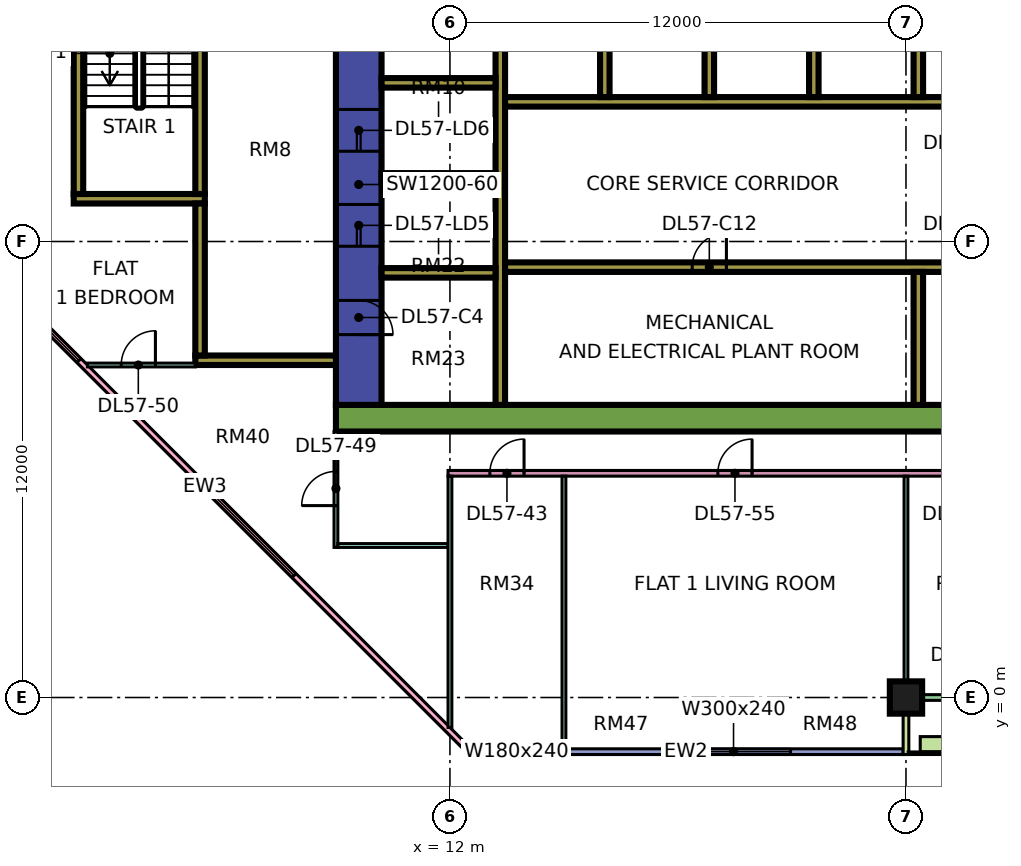
"""IFC4 building model, lengths in metres.
Left out: names, types, materials, properties, quantities, classifications, styles, units other than length and angle.
Written with IfcOpenShell. Run it as: python <this file> out.ifc"""

import sys

from ifc_helpers import new_model, si_unit, direction, frame, frame_2d, origin, origin_2d, place, context, subcontext, project, spatial, rectangle, extrude, element, fill, save


model = new_model("IFC4")
c1 = context("Model", 3, precision=1e-05, world=origin(), true_north=direction((0.0, 1.0)))
c2 = subcontext(c1, "Body", "Model", "MODEL_VIEW")
j1 = project(units=[si_unit("LENGTHUNIT", "METRE"), si_unit("PLANEANGLEUNIT", "RADIAN")], contexts=[c1])
p1 = place(None, origin())
s1 = spatial("IfcSite", under=j1, at=p1, CompositionType="ELEMENT")
p2 = place(p1, origin())
s2 = spatial("IfcBuilding", under=s1, at=p2, CompositionType="ELEMENT")
p3 = place(p2, frame((0.0, 0.0, 241.65)))
s3 = spatial("IfcBuildingStorey", under=s2, at=p3, CompositionType="ELEMENT", Elevation=241.65)
p4 = place(p3, frame((24.0, 0.0, 0.0), z_axis=(0.0, 0.0, 1.0), x_axis=(1.0, 0.0, 0.0)))
e1 = element("IfcColumn", 1, at=p4, inside=s3, PredefinedType="COLUMN", context=c2, shape_type="SweptSolid", body=[
    extrude(rectangle(XDim=0.85, YDim=0.85, at=origin_2d()), origin(), (0.0, 0.0, 1.0), 3.75),
])
p5 = place(p3, frame((9.0, 7.35, 0.0), z_axis=(0.0, 0.0, 1.0), x_axis=(1.0, 0.0, 0.0)))
e2 = element("IfcWall", 2, at=p5, inside=s3, PredefinedType="SHEAR", context=c2, shape_type="SweptSolid", body=[
    extrude(rectangle(XDim=25.0, YDim=0.7, at=frame_2d((12.5, 0.0))), origin(), (0.0, 0.0, 1.0), 3.75),
])
p6 = place(p3, frame((9.6, 7.7, 0.0), z_axis=(0.0, 0.0, 1.0), x_axis=(0.0, 1.0, 0.0)))
e3 = element("IfcWall", 3, at=p6, inside=s3, PredefinedType="SHEAR", context=c2, shape_type="SweptSolid", body=[
    extrude(rectangle(XDim=11.6, YDim=1.2, at=frame_2d((5.8, 0.0))), origin(), (0.0, 0.0, 1.0), 3.75),
])
p7 = place(p6, frame((4.175, 0.0, 0.0)))
e4 = element("IfcOpeningElement", 4, at=p7, cuts=e3, PredefinedType="OPENING", context=c2, shape_type="SweptSolid", body=[
    extrude(rectangle(XDim=1.1, YDim=2.2, at=frame_2d((0.55, 1.1))), frame((0.0, 0.61, 0.0), z_axis=(0.0, -1.0, 0.0), x_axis=(1.0, 0.0, 0.0)), (0.0, 0.0, 1.0), 1.22),
])
p8 = place(p6, frame((6.675, 0.0, 0.0)))
e5 = element("IfcOpeningElement", 5, at=p8, cuts=e3, PredefinedType="OPENING", context=c2, shape_type="SweptSolid", body=[
    extrude(rectangle(XDim=1.1, YDim=2.2, at=frame_2d((0.55, 1.1))), frame((0.0, 0.61, 0.0), z_axis=(0.0, -1.0, 0.0), x_axis=(1.0, 0.0, 0.0)), (0.0, 0.0, 1.0), 1.22),
])
p9 = place(p6, frame((9.55, 0.0, 0.0)))
e6 = element("IfcOpeningElement", 6, at=p9, cuts=e3, PredefinedType="OPENING", context=c2, shape_type="SweptSolid", body=[
    extrude(rectangle(XDim=1.1, YDim=2.2, at=frame_2d((0.55, 1.1))), frame((0.0, 0.61, 0.0), z_axis=(0.0, -1.0, 0.0), x_axis=(1.0, 0.0, 0.0)), (0.0, 0.0, 1.0), 1.22),
])
p10 = place(p6, frame((1.85, 0.0, 0.0)))
e7 = element("IfcOpeningElement", 7, at=p10, cuts=e3, PredefinedType="OPENING", context=c2, shape_type="SweptSolid", body=[
    extrude(rectangle(XDim=0.9, YDim=2.1, at=frame_2d((0.45, 1.05))), frame((0.0, 0.61, 0.0), z_axis=(0.0, -1.0, 0.0), x_axis=(1.0, 0.0, 0.0)), (0.0, 0.0, 1.0), 1.22),
])
p11 = place(p3, frame((13.325, 7.7, 0.0), z_axis=(0.0, 0.0, 1.0), x_axis=(0.0, 1.0, 0.0)))
e8 = element("IfcWall", 8, at=p11, inside=s3, PredefinedType="SHEAR", context=c2, shape_type="SweptSolid", body=[
    extrude(rectangle(XDim=11.6, YDim=0.25, at=frame_2d((5.8, 0.0))), origin(), (0.0, 0.0, 1.0), 3.75),
])
p12 = place(p3, frame((13.45, 11.325, 0.0), z_axis=(0.0, 0.0, 1.0), x_axis=(1.0, 0.0, 0.0)))
e9 = element("IfcWall", 9, at=p12, inside=s3, PredefinedType="SHEAR", context=c2, shape_type="SweptSolid", body=[
    extrude(rectangle(XDim=19.85, YDim=0.25, at=frame_2d((9.925, 0.0))), origin(), (0.0, 0.0, 1.0), 3.75),
])
p13 = place(p12, frame((11.65, 0.0, 0.0)))
e10 = element("IfcOpeningElement", 10, at=p13, cuts=e9, PredefinedType="OPENING", context=c2, shape_type="SweptSolid", body=[
    extrude(rectangle(XDim=1.2, YDim=2.2, at=frame_2d((0.6, 1.1))), frame((0.0, 0.135, 0.0), z_axis=(0.0, -1.0, 0.0), x_axis=(1.0, 0.0, 0.0)), (0.0, 0.0, 1.0), 0.27),
])
p14 = place(p12, frame((14.4, 0.0, 0.0)))
e11 = element("IfcOpeningElement", 11, at=p14, cuts=e9, PredefinedType="OPENING", context=c2, shape_type="SweptSolid", body=[
    extrude(rectangle(XDim=1.2, YDim=2.2, at=frame_2d((0.6, 1.1))), frame((0.0, 0.135, 0.0), z_axis=(0.0, -1.0, 0.0), x_axis=(1.0, 0.0, 0.0)), (0.0, 0.0, 1.0), 0.27),
])
p15 = place(p12, frame((17.15, 0.0, 0.0)))
e12 = element("IfcOpeningElement", 12, at=p15, cuts=e9, PredefinedType="OPENING", context=c2, shape_type="SweptSolid", body=[
    extrude(rectangle(XDim=1.2, YDim=2.2, at=frame_2d((0.6, 1.1))), frame((0.0, 0.135, 0.0), z_axis=(0.0, -1.0, 0.0), x_axis=(1.0, 0.0, 0.0)), (0.0, 0.0, 1.0), 0.27),
])
p16 = place(p12, frame((4.925, 0.0, 0.0)))
e13 = element("IfcOpeningElement", 13, at=p16, cuts=e9, PredefinedType="OPENING", context=c2, shape_type="SweptSolid", body=[
    extrude(rectangle(XDim=0.9, YDim=2.1, at=frame_2d((0.45, 1.05))), frame((0.0, 0.135, 0.0), z_axis=(0.0, -1.0, 0.0), x_axis=(1.0, 0.0, 0.0)), (0.0, 0.0, 1.0), 0.27),
])
p17 = place(p3, frame((13.45, 15.675, 0.0), z_axis=(0.0, 0.0, 1.0), x_axis=(1.0, 0.0, 0.0)))
e14 = element("IfcWall", 14, at=p17, inside=s3, PredefinedType="SHEAR", context=c2, shape_type="SweptSolid", body=[
    extrude(rectangle(XDim=13.75, YDim=0.25, at=frame_2d((6.875, 0.0))), origin(), (0.0, 0.0, 1.0), 3.75),
])
p18 = place(p17, frame((11.65, 0.0, 0.0)))
e15 = element("IfcOpeningElement", 15, at=p18, cuts=e14, PredefinedType="OPENING", context=c2, shape_type="SweptSolid", body=[
    extrude(rectangle(XDim=1.2, YDim=2.2, at=frame_2d((0.6, 1.1))), frame((0.0, 0.135, 0.0), z_axis=(0.0, -1.0, 0.0), x_axis=(1.0, 0.0, 0.0)), (0.0, 0.0, 1.0), 0.27),
])
for number, where, z_axis, x_axis in (
    (16, (10.2, 11.175, 0.0), (0.0, 0.0, 1.0), (1.0, 0.0, 0.0)),
    (17, (10.2, 13.675, 0.0), (0.0, 0.0, 1.0), (1.0, 0.0, 0.0)),
    (18, (10.2, 16.175, 0.0), (0.0, 0.0, 1.0), (1.0, 0.0, 0.0)),
):
    element("IfcWall", number, at=place(p3, frame(where, z_axis=z_axis, x_axis=x_axis)), inside=s3, PredefinedType="SHEAR", context=c2, shape_type="SweptSolid", body=[
        extrude(rectangle(XDim=3.0, YDim=0.25, at=frame_2d((1.5, 0.0))), origin(), (0.0, 0.0, 1.0), 3.75),
    ])
for number, where, z_axis, x_axis in (
    (19, (24.325, 7.7, 0.0), (0.0, 0.0, 1.0), (0.0, 1.0, 0.0)),
    (20, (16.075, 15.8, 0.0), (0.0, 0.0, 1.0), (0.0, 1.0, 0.0)),
    (21, (18.825, 15.8, 0.0), (0.0, 0.0, 1.0), (0.0, 1.0, 0.0)),
    (22, (21.575, 15.8, 0.0), (0.0, 0.0, 1.0), (0.0, 1.0, 0.0)),
    (23, (24.325, 15.8, 0.0), (0.0, 0.0, 1.0), (0.0, 1.0, 0.0)),
):
    element("IfcWall", number, at=place(p3, frame(where, z_axis=z_axis, x_axis=x_axis)), inside=s3, PredefinedType="SHEAR", context=c2, shape_type="SweptSolid", body=[
        extrude(rectangle(XDim=3.5, YDim=0.25, at=frame_2d((1.75, 0.0))), origin(), (0.0, 0.0, 1.0), 3.75),
    ])
p19 = place(p3, frame((2.1, 13.125, 0.0), z_axis=(0.0, 0.0, 1.0), x_axis=(1.0, 0.0, 0.0)))
e24 = element("IfcWall", 24, at=p19, inside=s3, PredefinedType="SHEAR", context=c2, shape_type="SweptSolid", body=[
    extrude(rectangle(XDim=3.45, YDim=0.25, at=frame_2d((1.725, 0.0))), origin(), (0.0, 0.0, 1.0), 3.75),
])
p20 = place(p3, frame((2.225, 13.25, 0.0), z_axis=(0.0, 0.0, 1.0), x_axis=(0.0, 1.0, 0.0)))
e25 = element("IfcWall", 25, at=p20, inside=s3, PredefinedType="SHEAR", context=c2, shape_type="SweptSolid", body=[
    extrude(rectangle(XDim=6.5, YDim=0.25, at=frame_2d((3.25, 0.0))), origin(), (0.0, 0.0, 1.0), 3.75),
])
p21 = place(p3, frame((5.425, 13.25, 0.0), z_axis=(0.0, 0.0, 1.0), x_axis=(0.0, 1.0, 0.0)))
e26 = element("IfcWall", 26, at=p21, inside=s3, PredefinedType="SHEAR", context=c2, shape_type="SweptSolid", body=[
    extrude(rectangle(XDim=6.5, YDim=0.25, at=frame_2d((3.25, 0.0))), origin(), (0.0, 0.0, 1.0), 3.75),
])
p22 = place(p21, frame((5.25, 0.0, 0.0)))
e27 = element("IfcOpeningElement", 27, at=p22, cuts=e26, PredefinedType="OPENING", context=c2, shape_type="SweptSolid", body=[
    extrude(rectangle(XDim=1.1, YDim=2.2, at=frame_2d((0.55, 1.1))), frame((0.0, 0.135, 0.0), z_axis=(0.0, -1.0, 0.0), x_axis=(1.0, 0.0, 0.0)), (0.0, 0.0, 1.0), 0.27),
])
p23 = place(p3, frame((5.3, 8.875, 0.0), z_axis=(0.0, 0.0, 1.0), x_axis=(1.0, 0.0, 0.0)))
e28 = element("IfcWall", 28, at=p23, inside=s3, PredefinedType="SHEAR", context=c2, shape_type="SweptSolid", body=[
    extrude(rectangle(XDim=3.7, YDim=0.25, at=frame_2d((1.85, 0.0))), origin(), (0.0, 0.0, 1.0), 3.75),
])
p24 = place(p3, frame((5.425, 9.0, 0.0), z_axis=(0.0, 0.0, 1.0), x_axis=(0.0, 1.0, 0.0)))
e29 = element("IfcWall", 29, at=p24, inside=s3, PredefinedType="SHEAR", context=c2, shape_type="SweptSolid", body=[
    extrude(rectangle(XDim=4.0, YDim=0.25, at=frame_2d((2.0, 0.0))), origin(), (0.0, 0.0, 1.0), 3.75),
])
p25 = place(p3, frame((-1.447, 12.553, 0.0), z_axis=(0.0, 0.0, 1.0), x_axis=(0.707106781187, -0.707106781187, 0.0)))
e30 = element("IfcWall", 30, at=p25, inside=s3, PredefinedType="SOLIDWALL", context=c2, shape_type="SweptSolid", body=[
    extrude(rectangle(XDim=19.799, YDim=0.15, at=frame_2d((9.899, 0.0))), origin(), (0.0, 0.0, 1.0), 3.35),
])
p26 = place(p25, frame((2.212, 0.0, 0.45)))
e31 = element("IfcOpeningElement", 31, at=p26, cuts=e30, PredefinedType="OPENING", context=c2, shape_type="SweptSolid", body=[
    extrude(rectangle(XDim=3.0, YDim=2.4, at=frame_2d((1.5, 1.2))), frame((0.0, 0.085, 0.0), z_axis=(0.0, -1.0, 0.0), x_axis=(1.0, 0.0, 0.0)), (0.0, 0.0, 1.0), 0.17),
])
p27 = place(p25, frame((10.216, 0.0, 0.45)))
e32 = element("IfcOpeningElement", 32, at=p27, cuts=e30, PredefinedType="OPENING", context=c2, shape_type="SweptSolid", body=[
    extrude(rectangle(XDim=3.0, YDim=2.4, at=frame_2d((1.5, 1.2))), frame((0.0, 0.085, 0.0), z_axis=(0.0, -1.0, 0.0), x_axis=(1.0, 0.0, 0.0)), (0.0, 0.0, 1.0), 0.17),
])
p28 = place(p3, frame((12.5, -1.425, 0.0), z_axis=(0.0, 0.0, 1.0), x_axis=(1.0, 0.0, 0.0)))
e33 = element("IfcWall", 33, at=p28, inside=s3, PredefinedType="SOLIDWALL", context=c2, shape_type="SweptSolid", body=[
    extrude(rectangle(XDim=11.425, YDim=0.15, at=frame_2d((5.712, 0.0))), origin(), (0.0, 0.0, 1.0), 3.35),
])
p29 = place(p28, frame((0.35, 0.0, 0.45)))
e34 = element("IfcOpeningElement", 34, at=p29, cuts=e33, PredefinedType="OPENING", context=c2, shape_type="SweptSolid", body=[
    extrude(rectangle(XDim=1.8, YDim=2.4, at=frame_2d((0.9, 1.2))), frame((0.0, 0.085, 0.0), z_axis=(0.0, -1.0, 0.0), x_axis=(1.0, 0.0, 0.0)), (0.0, 0.0, 1.0), 0.17),
])
p30 = place(p28, frame((5.462, 0.0, 0.45)))
e35 = element("IfcOpeningElement", 35, at=p30, cuts=e33, PredefinedType="OPENING", context=c2, shape_type="SweptSolid", body=[
    extrude(rectangle(XDim=3.0, YDim=2.4, at=frame_2d((1.5, 1.2))), frame((0.0, 0.085, 0.0), z_axis=(0.0, -1.0, 0.0), x_axis=(1.0, 0.0, 0.0)), (0.0, 0.0, 1.0), 0.17),
])
p31 = place(p3, frame((24.075, 0.0, 0.0), z_axis=(0.0, 0.0, 1.0), x_axis=(1.0, 0.0, 0.0)))
e36 = element("IfcWall", 36, at=p31, inside=s3, PredefinedType="SOLIDWALL", context=c2, shape_type="SweptSolid", body=[
    extrude(rectangle(XDim=11.85, YDim=0.15, at=frame_2d((5.925, 0.0))), origin(), (0.0, 0.0, 1.0), 3.35),
])
p32 = place(p31, frame((1.087, 0.0, 0.0)))
e37 = element("IfcOpeningElement", 37, at=p32, cuts=e36, PredefinedType="OPENING", context=c2, shape_type="SweptSolid", body=[
    extrude(rectangle(XDim=1.2, YDim=2.4, at=frame_2d((0.6, 1.2))), frame((0.0, 0.085, 0.0), z_axis=(0.0, -1.0, 0.0), x_axis=(1.0, 0.0, 0.0)), (0.0, 0.0, 1.0), 0.17),
])
p33 = place(p31, frame((4.425, 0.0, 0.45)))
e38 = element("IfcOpeningElement", 38, at=p33, cuts=e36, PredefinedType="OPENING", context=c2, shape_type="SweptSolid", body=[
    extrude(rectangle(XDim=3.0, YDim=2.4, at=frame_2d((1.5, 1.2))), frame((0.0, 0.085, 0.0), z_axis=(0.0, -1.0, 0.0), x_axis=(1.0, 0.0, 0.0)), (0.0, 0.0, 1.0), 0.17),
])
p34 = place(p31, frame((9.562, 0.0, 0.45)))
e39 = element("IfcOpeningElement", 39, at=p34, cuts=e36, PredefinedType="OPENING", context=c2, shape_type="SweptSolid", body=[
    extrude(rectangle(XDim=1.2, YDim=2.4, at=frame_2d((0.6, 1.2))), frame((0.0, 0.085, 0.0), z_axis=(0.0, -1.0, 0.0), x_axis=(1.0, 0.0, 0.0)), (0.0, 0.0, 1.0), 0.17),
])
p35 = place(p3, frame((24.0, -1.5, 0.0), z_axis=(0.0, 0.0, 1.0), x_axis=(0.0, 1.0, 0.0)))
e40 = element("IfcWall", 40, at=p35, inside=s3, PredefinedType="SOLIDWALL", context=c2, shape_type="SweptSolid", body=[
    extrude(rectangle(XDim=1.5, YDim=0.15, at=frame_2d((0.75, 0.0))), origin(), (0.0, 0.0, 1.0), 3.35),
])
p36 = place(p3, frame((24.375, -1.229, 0.0), z_axis=(0.0, 0.0, 1.0), x_axis=(1.0, 0.0, 0.0)))
e41 = element("IfcWall", 41, at=p36, inside=s3, PredefinedType="SOLIDWALL", context=c2, shape_type="SweptSolid", body=[
    extrude(rectangle(XDim=11.25, YDim=0.4, at=frame_2d((5.625, 0.0))), origin(), (0.0, 0.0, 1.0), 0.7),
])
p37 = place(p3, frame((2.461, 8.75, 0.0), z_axis=(0.0, 0.0, 1.0), x_axis=(1.0, 0.0, 0.0)))
e42 = element("IfcWall", 42, at=p37, inside=s3, PredefinedType="PARTITIONING", context=c2, shape_type="SweptSolid", body=[
    extrude(rectangle(XDim=2.839, YDim=0.1, at=frame_2d((1.419, 0.0))), origin(), (0.0, 0.0, 1.0), 3.35),
])
p38 = place(p37, frame((0.889, 0.0, 0.0)))
e43 = element("IfcOpeningElement", 43, at=p38, cuts=e42, PredefinedType="OPENING", context=c2, shape_type="SweptSolid", body=[
    extrude(rectangle(XDim=0.9, YDim=2.1, at=frame_2d((0.45, 1.05))), frame((0.0, 0.06, 0.0), z_axis=(0.0, -1.0, 0.0), x_axis=(1.0, 0.0, 0.0)), (0.0, 0.0, 1.0), 0.12),
])
p39 = place(p3, frame((9.0, 3.95, 0.0), z_axis=(0.0, 0.0, 1.0), x_axis=(0.0, 1.0, 0.0)))
e44 = element("IfcWall", 44, at=p39, inside=s3, PredefinedType="PARTITIONING", context=c2, shape_type="SweptSolid", body=[
    extrude(rectangle(XDim=3.05, YDim=0.1, at=frame_2d((1.525, 0.0))), origin(), (0.0, 0.0, 1.0), 3.35),
])
p40 = place(p39, frame((1.1, 0.0, 0.0)))
e45 = element("IfcOpeningElement", 45, at=p40, cuts=e44, PredefinedType="OPENING", context=c2, shape_type="SweptSolid", body=[
    extrude(rectangle(XDim=0.9, YDim=2.1, at=frame_2d((0.45, 1.05))), frame((0.0, 0.06, 0.0), z_axis=(0.0, -1.0, 0.0), x_axis=(1.0, 0.0, 0.0)), (0.0, 0.0, 1.0), 0.12),
])
p41 = place(p3, frame((9.05, 4.0, 0.0), z_axis=(0.0, 0.0, 1.0), x_axis=(1.0, 0.0, 0.0)))
e46 = element("IfcWall", 46, at=p41, inside=s3, PredefinedType="PARTITIONING", context=c2, shape_type="SweptSolid", body=[
    extrude(rectangle(XDim=2.9, YDim=0.1, at=frame_2d((1.45, 0.0))), origin(), (0.0, 0.0, 1.0), 3.35),
])
p42 = place(p3, frame((11.95, 5.9, 0.0), z_axis=(0.0, 0.0, 1.0), x_axis=(1.0, 0.0, 0.0)))
e47 = element("IfcWall", 47, at=p42, inside=s3, PredefinedType="PARTITIONING", context=c2, shape_type="SweptSolid", body=[
    extrude(rectangle(XDim=21.1, YDim=0.15, at=frame_2d((10.55, 0.0))), origin(), (0.0, 0.0, 1.0), 3.35),
])
p43 = place(p42, frame((1.1, 0.0, 0.0)))
e48 = element("IfcOpeningElement", 48, at=p43, cuts=e47, PredefinedType="OPENING", context=c2, shape_type="SweptSolid", body=[
    extrude(rectangle(XDim=0.9, YDim=2.1, at=frame_2d((0.45, 1.05))), frame((0.0, 0.085, 0.0), z_axis=(0.0, -1.0, 0.0), x_axis=(1.0, 0.0, 0.0)), (0.0, 0.0, 1.0), 0.17),
])
p44 = place(p42, frame((13.1, 0.0, 0.0)))
e49 = element("IfcOpeningElement", 49, at=p44, cuts=e47, PredefinedType="OPENING", context=c2, shape_type="SweptSolid", body=[
    extrude(rectangle(XDim=0.9, YDim=2.1, at=frame_2d((0.45, 1.05))), frame((0.0, 0.085, 0.0), z_axis=(0.0, -1.0, 0.0), x_axis=(1.0, 0.0, 0.0)), (0.0, 0.0, 1.0), 0.17),
])
p45 = place(p42, frame((7.1, 0.0, 0.0)))
e50 = element("IfcOpeningElement", 50, at=p45, cuts=e47, PredefinedType="OPENING", context=c2, shape_type="SweptSolid", body=[
    extrude(rectangle(XDim=0.9, YDim=2.1, at=frame_2d((0.45, 1.05))), frame((0.0, 0.085, 0.0), z_axis=(0.0, -1.0, 0.0), x_axis=(1.0, 0.0, 0.0)), (0.0, 0.0, 1.0), 0.17),
])
p46 = place(p3, frame((12.0, -0.788, 0.0), z_axis=(0.0, 0.0, 1.0), x_axis=(0.0, 1.0, 0.0)))
e51 = element("IfcWall", 51, at=p46, inside=s3, PredefinedType="PARTITIONING", context=c2, shape_type="SweptSolid", body=[
    extrude(rectangle(XDim=6.613, YDim=0.1, at=frame_2d((3.306, 0.0))), origin(), (0.0, 0.0, 1.0), 3.35),
])
p47 = place(p3, frame((15.0, -1.35, 0.0), z_axis=(0.0, 0.0, 1.0), x_axis=(0.0, 1.0, 0.0)))
e52 = element("IfcWall", 52, at=p47, inside=s3, PredefinedType="PARTITIONING", context=c2, shape_type="SweptSolid", body=[
    extrude(rectangle(XDim=7.175, YDim=0.1, at=frame_2d((3.587, 0.0))), origin(), (0.0, 0.0, 1.0), 3.35),
])
p48 = place(p3, frame((24.0, 0.0, 0.0), z_axis=(0.0, 0.0, 1.0), x_axis=(0.0, 1.0, 0.0)))
e53 = element("IfcWall", 53, at=p48, inside=s3, PredefinedType="PARTITIONING", context=c2, shape_type="SweptSolid", body=[
    extrude(rectangle(XDim=5.825, YDim=0.1, at=frame_2d((2.913, 0.0))), origin(), (0.0, 0.0, 1.0), 3.35),
])
p49 = place(p26, origin())
e54 = element("IfcWindow", 54, at=p49, inside=s3, PartitioningType="SINGLE_PANEL", PredefinedType="WINDOW", context=c2, shape_type="SweptSolid", body=[
    extrude(rectangle(XDim=3.0, YDim=2.4, at=frame_2d((1.5, 1.2))), frame((0.0, 0.03, 0.0), z_axis=(0.0, -1.0, 0.0), x_axis=(1.0, 0.0, 0.0)), (0.0, 0.0, 1.0), 0.06),
])
fill(e31, e54)
p50 = place(p27, origin())
e55 = element("IfcWindow", 55, at=p50, inside=s3, PartitioningType="SINGLE_PANEL", PredefinedType="WINDOW", context=c2, shape_type="SweptSolid", body=[
    extrude(rectangle(XDim=3.0, YDim=2.4, at=frame_2d((1.5, 1.2))), frame((0.0, 0.03, 0.0), z_axis=(0.0, -1.0, 0.0), x_axis=(1.0, 0.0, 0.0)), (0.0, 0.0, 1.0), 0.06),
])
fill(e32, e55)
p51 = place(p29, origin())
e56 = element("IfcWindow", 56, at=p51, inside=s3, PartitioningType="SINGLE_PANEL", PredefinedType="WINDOW", context=c2, shape_type="SweptSolid", body=[
    extrude(rectangle(XDim=1.8, YDim=2.4, at=frame_2d((0.9, 1.2))), frame((0.0, 0.03, 0.0), z_axis=(0.0, -1.0, 0.0), x_axis=(1.0, 0.0, 0.0)), (0.0, 0.0, 1.0), 0.06),
])
fill(e34, e56)
p52 = place(p30, origin())
e57 = element("IfcWindow", 57, at=p52, inside=s3, PartitioningType="SINGLE_PANEL", PredefinedType="WINDOW", context=c2, shape_type="SweptSolid", body=[
    extrude(rectangle(XDim=3.0, YDim=2.4, at=frame_2d((1.5, 1.2))), frame((0.0, 0.03, 0.0), z_axis=(0.0, -1.0, 0.0), x_axis=(1.0, 0.0, 0.0)), (0.0, 0.0, 1.0), 0.06),
])
fill(e35, e57)
p53 = place(p7, origin())
e58 = element("IfcDoor", 58, at=p53, inside=s3, OperationType="DOUBLE_DOOR_SLIDING", PredefinedType="DOOR", context=c2, shape_type="SweptSolid", body=[
    extrude(rectangle(XDim=1.1, YDim=2.2, at=frame_2d((0.55, 1.1))), frame((0.0, 0.025, 0.0), z_axis=(0.0, -1.0, 0.0), x_axis=(1.0, 0.0, 0.0)), (0.0, 0.0, 1.0), 0.05),
])
fill(e4, e58)
p54 = place(p8, origin())
e59 = element("IfcDoor", 59, at=p54, inside=s3, OperationType="DOUBLE_DOOR_SLIDING", PredefinedType="DOOR", context=c2, shape_type="SweptSolid", body=[
    extrude(rectangle(XDim=1.1, YDim=2.2, at=frame_2d((0.55, 1.1))), frame((0.0, 0.025, 0.0), z_axis=(0.0, -1.0, 0.0), x_axis=(1.0, 0.0, 0.0)), (0.0, 0.0, 1.0), 0.05),
])
fill(e5, e59)
p55 = place(p10, frame((0.9, 0.0, 0.0), z_axis=(0.0, 0.0, 1.0), x_axis=(-1.0, 0.0, 0.0)))
e60 = element("IfcDoor", 60, at=p55, inside=s3, OperationType="SINGLE_SWING_LEFT", PredefinedType="DOOR", context=c2, shape_type="SweptSolid", body=[
    extrude(rectangle(XDim=0.9, YDim=2.1, at=frame_2d((0.45, 1.05))), frame((0.0, 0.025, 0.0), z_axis=(0.0, -1.0, 0.0), x_axis=(1.0, 0.0, 0.0)), (0.0, 0.0, 1.0), 0.05),
])
fill(e7, e60)
p56 = place(p16, frame((0.9, 0.0, 0.0), z_axis=(0.0, 0.0, 1.0), x_axis=(-1.0, 0.0, 0.0)))
e61 = element("IfcDoor", 61, at=p56, inside=s3, OperationType="SINGLE_SWING_RIGHT", PredefinedType="DOOR", context=c2, shape_type="SweptSolid", body=[
    extrude(rectangle(XDim=0.9, YDim=2.1, at=frame_2d((0.45, 1.05))), frame((0.0, 0.025, 0.0), z_axis=(0.0, -1.0, 0.0), x_axis=(1.0, 0.0, 0.0)), (0.0, 0.0, 1.0), 0.05),
])
fill(e13, e61)
p57 = place(p43, frame((0.9, 0.0, 0.0), z_axis=(0.0, 0.0, 1.0), x_axis=(-1.0, 0.0, 0.0)))
e62 = element("IfcDoor", 62, at=p57, inside=s3, OperationType="SINGLE_SWING_RIGHT", PredefinedType="DOOR", context=c2, shape_type="SweptSolid", body=[
    extrude(rectangle(XDim=0.9, YDim=2.1, at=frame_2d((0.45, 1.05))), frame((0.0, 0.025, 0.0), z_axis=(0.0, -1.0, 0.0), x_axis=(1.0, 0.0, 0.0)), (0.0, 0.0, 1.0), 0.05),
])
fill(e48, e62)
p58 = place(p40, origin())
e63 = element("IfcDoor", 63, at=p58, inside=s3, OperationType="SINGLE_SWING_LEFT", PredefinedType="DOOR", context=c2, shape_type="SweptSolid", body=[
    extrude(rectangle(XDim=0.9, YDim=2.1, at=frame_2d((0.45, 1.05))), frame((0.0, 0.025, 0.0), z_axis=(0.0, -1.0, 0.0), x_axis=(1.0, 0.0, 0.0)), (0.0, 0.0, 1.0), 0.05),
])
fill(e45, e63)
p59 = place(p38, frame((0.9, 0.0, 0.0), z_axis=(0.0, 0.0, 1.0), x_axis=(-1.0, 0.0, 0.0)))
e64 = element("IfcDoor", 64, at=p59, inside=s3, OperationType="SINGLE_SWING_RIGHT", PredefinedType="DOOR", context=c2, shape_type="SweptSolid", body=[
    extrude(rectangle(XDim=0.9, YDim=2.1, at=frame_2d((0.45, 1.05))), frame((0.0, 0.025, 0.0), z_axis=(0.0, -1.0, 0.0), x_axis=(1.0, 0.0, 0.0)), (0.0, 0.0, 1.0), 0.05),
])
fill(e43, e64)
p60 = place(p45, frame((0.9, 0.0, 0.0), z_axis=(0.0, 0.0, 1.0), x_axis=(-1.0, 0.0, 0.0)))
e65 = element("IfcDoor", 65, at=p60, inside=s3, OperationType="SINGLE_SWING_RIGHT", PredefinedType="DOOR", context=c2, shape_type="SweptSolid", body=[
    extrude(rectangle(XDim=0.9, YDim=2.1, at=frame_2d((0.45, 1.05))), frame((0.0, 0.025, 0.0), z_axis=(0.0, -1.0, 0.0), x_axis=(1.0, 0.0, 0.0)), (0.0, 0.0, 1.0), 0.05),
])
fill(e50, e65)
save(model, sys.argv[1])
